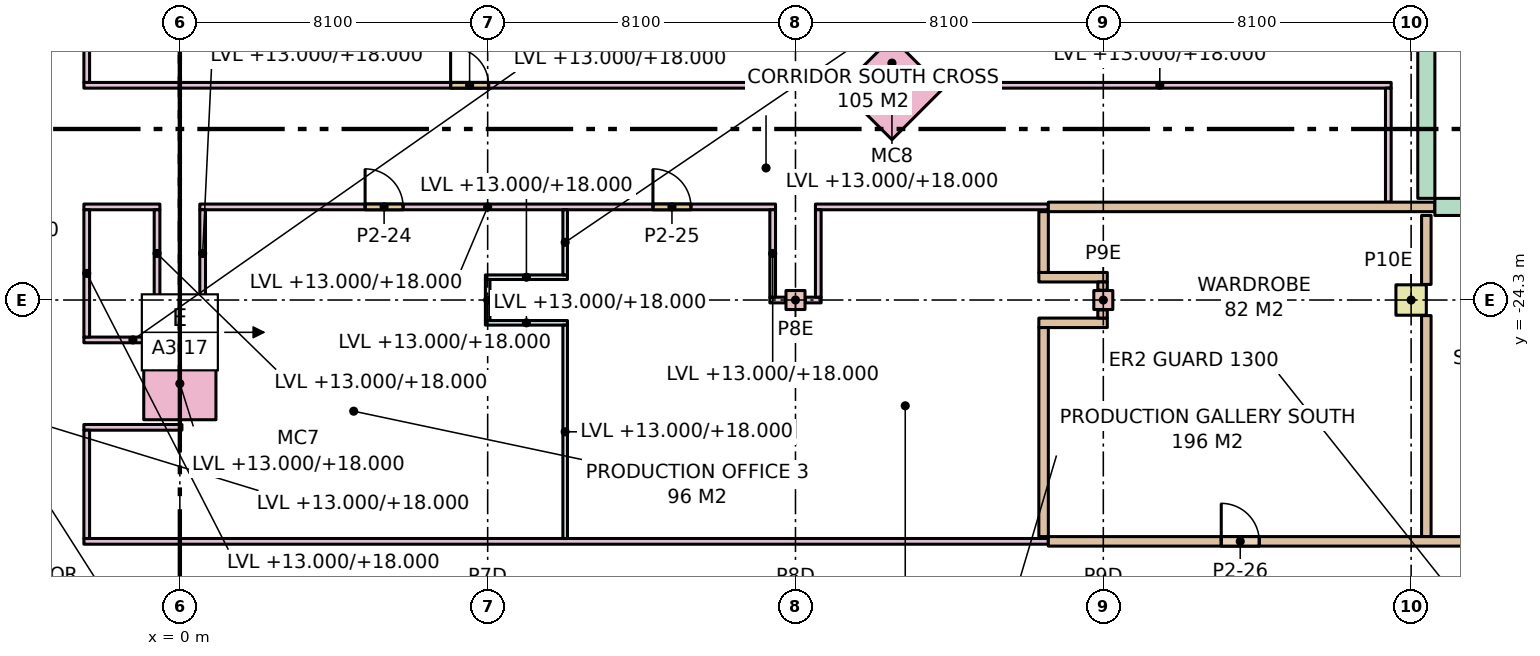
"""IFC4 building model, lengths in metres.
Left out: names, types, materials, properties, quantities, classifications, styles, units other than length and angle.
Written with IfcOpenShell. Run it as: python <this file> out.ifc"""

import sys

from ifc_helpers import new_model, si_unit, direction, frame, frame_2d, origin, origin_2d, place, context, subcontext, project, spatial, rectangle, extrude, element, fill, save


model = new_model("IFC4")
c1 = context("Model", 3, precision=1e-05, world=origin(), true_north=direction((0.0, 1.0)))
c2 = subcontext(c1, "Body", "Model", "MODEL_VIEW")
j1 = project(units=[si_unit("LENGTHUNIT", "METRE"), si_unit("PLANEANGLEUNIT", "RADIAN")], contexts=[c1])
p1 = place(None, origin())
s1 = spatial("IfcSite", under=j1, at=p1, CompositionType="ELEMENT")
p2 = place(p1, origin())
s2 = spatial("IfcBuilding", under=s1, at=p2, CompositionType="ELEMENT")
p3 = place(p2, frame((0.0, 0.0, 13.0)))
s3 = spatial("IfcBuildingStorey", under=s2, at=p3, CompositionType="ELEMENT", Elevation=13.0)
for number, where, z_axis, x_axis in (
    (1, (16.2, -24.3, 0.0), (0.0, 0.0, 1.0), (1.0, 0.0, 0.0)),
    (2, (24.3, -24.3, 0.0), (0.0, 0.0, 1.0), (1.0, 0.0, 0.0)),
):
    element("IfcColumn", number, at=place(p3, frame(where, z_axis=z_axis, x_axis=x_axis)), inside=s3, PredefinedType="COLUMN", context=c2, shape_type="SweptSolid", body=[
        extrude(rectangle(XDim=0.5, YDim=0.5, at=origin_2d()), origin(), (0.0, 0.0, 1.0), 7.0),
    ])
p4 = place(p3, frame((32.4, -24.3, 0.0), z_axis=(0.0, 0.0, 1.0), x_axis=(1.0, 0.0, 0.0)))
e3 = element("IfcColumn", 3, at=p4, inside=s3, PredefinedType="COLUMN", context=c2, shape_type="SweptSolid", body=[
    extrude(rectangle(XDim=0.8, YDim=0.8, at=origin_2d()), origin(), (0.0, 0.0, 1.0), 7.0),
])
for number, where, z_axis, x_axis in (
    (4, (0.0, -26.5, 0.0), (0.0, 0.0, 1.0), (1.0, 0.0, 0.0)),
    (5, (18.738, -18.738, 0.0), (0.0, 0.0, 1.0), (0.707, 0.707, 0.0)),
):
    element("IfcColumn", number, at=place(p3, frame(where, z_axis=z_axis, x_axis=x_axis)), inside=s3, PredefinedType="COLUMN", context=c2, shape_type="SweptSolid", body=[
        extrude(rectangle(XDim=1.9, YDim=1.9, at=origin_2d()), origin(), (0.0, 0.0, 1.0), 5.0),
    ])
for number, where, z_axis, x_axis in (
    (6, (8.04, -24.9, 0.0), (0.0, 0.0, 1.0), (1.0, 0.0, 0.0)),
    (7, (8.04, -23.7, 0.0), (0.0, 0.0, 1.0), (1.0, 0.0, 0.0)),
):
    element("IfcWall", number, at=place(p3, frame(where, z_axis=z_axis, x_axis=x_axis)), inside=s3, PredefinedType="PARTITIONING", context=c2, shape_type="SweptSolid", body=[
        extrude(rectangle(XDim=2.159, YDim=0.12, at=frame_2d((1.08, 0.0))), origin(), (0.0, 0.0, 1.0), 5.0),
    ])
p5 = place(p3, frame((8.1, -24.84, 0.0), z_axis=(0.0, 0.0, 1.0), x_axis=(0.0, 1.0, 0.0)))
e8 = element("IfcWall", 8, at=p5, inside=s3, PredefinedType="PARTITIONING", context=c2, shape_type="SweptSolid", body=[
    extrude(rectangle(XDim=1.08, YDim=0.12, at=frame_2d((0.54, 0.0))), origin(), (0.0, 0.0, 1.0), 5.0),
])
p6 = place(p3, frame((10.139, -30.575, 0.0), z_axis=(0.0, 0.0, 1.0), x_axis=(0.0, 1.0, 0.0)))
e9 = element("IfcWall", 9, at=p6, inside=s3, PredefinedType="PARTITIONING", context=c2, shape_type="SweptSolid", body=[
    extrude(rectangle(XDim=5.615, YDim=0.12, at=frame_2d((2.808, 0.0))), origin(), (0.0, 0.0, 1.0), 5.0),
])
p7 = place(p3, frame((10.139, -23.64, 0.0), z_axis=(0.0, 0.0, 1.0), x_axis=(0.0, 1.0, 0.0)))
e10 = element("IfcWall", 10, at=p7, inside=s3, PredefinedType="PARTITIONING", context=c2, shape_type="SweptSolid", body=[
    extrude(rectangle(XDim=1.715, YDim=0.12, at=frame_2d((0.857, 0.0))), origin(), (0.0, 0.0, 1.0), 5.0),
])
p8 = place(p3, frame((-0.675, -24.3, 0.0), z_axis=(0.0, 0.0, 1.0), x_axis=(1.0, 0.0, 0.0)))
e11 = element("IfcWall", 11, at=p8, inside=s3, PredefinedType="PARTITIONING", context=c2, shape_type="SweptSolid", body=[
    extrude(rectangle(XDim=1.35, YDim=0.15, at=frame_2d((0.675, 0.0))), origin(), (0.0, 0.0, 1.0), 6.68),
])
p9 = place(p3, frame((-2.525, -21.85, 0.0), z_axis=(0.0, 0.0, 1.0), x_axis=(1.0, 0.0, 0.0)))
e12 = element("IfcWall", 12, at=p9, inside=s3, PredefinedType="PARTITIONING", context=c2, shape_type="SweptSolid", body=[
    extrude(rectangle(XDim=2.0, YDim=0.15, at=frame_2d((1.0, 0.0))), origin(), (0.0, 0.0, 1.0), 5.0),
])
p10 = place(p3, frame((0.525, -21.85, 0.0), z_axis=(0.0, 0.0, 1.0), x_axis=(1.0, 0.0, 0.0)))
e13 = element("IfcWall", 13, at=p10, inside=s3, PredefinedType="PARTITIONING", context=c2, shape_type="SweptSolid", body=[
    extrude(rectangle(XDim=15.15, YDim=0.15, at=frame_2d((7.575, 0.0))), origin(), (0.0, 0.0, 1.0), 5.0),
])
p11 = place(p10, frame((4.35, 0.0, 0.0)))
e14 = element("IfcOpeningElement", 14, at=p11, cuts=e13, PredefinedType="OPENING", context=c2, shape_type="SweptSolid", body=[
    extrude(rectangle(XDim=1.0, YDim=2.1, at=frame_2d((0.5, 1.05))), frame((0.0, 0.085, 0.0), z_axis=(0.0, -1.0, 0.0), x_axis=(1.0, 0.0, 0.0)), (0.0, 0.0, 1.0), 0.17),
])
p12 = place(p10, frame((11.924, 0.0, 0.0)))
e15 = element("IfcOpeningElement", 15, at=p12, cuts=e13, PredefinedType="OPENING", context=c2, shape_type="SweptSolid", body=[
    extrude(rectangle(XDim=1.0, YDim=2.1, at=frame_2d((0.5, 1.05))), frame((0.0, 0.085, 0.0), z_axis=(0.0, -1.0, 0.0), x_axis=(1.0, 0.0, 0.0)), (0.0, 0.0, 1.0), 0.17),
])
for number, where, z_axis, x_axis in (
    (16, (-0.6, -24.225, 0.0), (0.0, 0.0, 1.0), (0.0, 1.0, 0.0)),
    (17, (0.6, -24.225, 0.0), (0.0, 0.0, 1.0), (0.0, 1.0, 0.0)),
):
    element("IfcWall", number, at=place(p3, frame(where, z_axis=z_axis, x_axis=x_axis)), inside=s3, PredefinedType="PARTITIONING", context=c2, shape_type="SweptSolid", body=[
        extrude(rectangle(XDim=2.3, YDim=0.15, at=frame_2d((1.15, 0.0))), origin(), (0.0, 0.0, 1.0), 5.0),
    ])
p13 = place(p3, frame((-2.525, -30.65, 0.0), z_axis=(0.0, 0.0, 1.0), x_axis=(1.0, 0.0, 0.0)))
e18 = element("IfcWall", 18, at=p13, inside=s3, PredefinedType="PARTITIONING", context=c2, shape_type="SweptSolid", body=[
    extrude(rectangle(XDim=25.378, YDim=0.15, at=frame_2d((12.689, 0.0))), origin(), (0.0, 0.0, 1.0), 6.68),
])
p14 = place(p3, frame((-2.525, -27.65, 0.0), z_axis=(0.0, 0.0, 1.0), x_axis=(1.0, 0.0, 0.0)))
e19 = element("IfcWall", 19, at=p14, inside=s3, PredefinedType="PARTITIONING", context=c2, shape_type="SweptSolid", body=[
    extrude(rectangle(XDim=2.58, YDim=0.15, at=frame_2d((1.29, 0.0))), origin(), (0.0, 0.0, 1.0), 6.68),
])
p15 = place(p3, frame((-2.525, -25.35, 0.0), z_axis=(0.0, 0.0, 1.0), x_axis=(1.0, 0.0, 0.0)))
e20 = element("IfcWall", 20, at=p15, inside=s3, PredefinedType="PARTITIONING", context=c2, shape_type="SweptSolid", body=[
    extrude(rectangle(XDim=2.58, YDim=0.15, at=frame_2d((1.29, 0.0))), origin(), (0.0, 0.0, 1.0), 5.0),
])
p16 = place(p3, frame((-2.45, -30.575, 0.0), z_axis=(0.0, 0.0, 1.0), x_axis=(0.0, 1.0, 0.0)))
e21 = element("IfcWall", 21, at=p16, inside=s3, PredefinedType="PARTITIONING", context=c2, shape_type="SweptSolid", body=[
    extrude(rectangle(XDim=2.85, YDim=0.15, at=frame_2d((1.425, 0.0))), origin(), (0.0, 0.0, 1.0), 6.68),
])
p17 = place(p3, frame((-2.45, -25.275, 0.0), z_axis=(0.0, 0.0, 1.0), x_axis=(0.0, 1.0, 0.0)))
e22 = element("IfcWall", 22, at=p17, inside=s3, PredefinedType="PARTITIONING", context=c2, shape_type="SweptSolid", body=[
    extrude(rectangle(XDim=3.35, YDim=0.15, at=frame_2d((1.675, 0.0))), origin(), (0.0, 0.0, 1.0), 5.0),
])
for number, where, z_axis, x_axis in (
    (23, (15.525, -24.3, 0.0), (0.0, 0.0, 1.0), (1.0, 0.0, 0.0)),
    (24, (16.46, -24.3, 0.0), (0.0, 0.0, 1.0), (1.0, 0.0, 0.0)),
):
    element("IfcWall", number, at=place(p3, frame(where, z_axis=z_axis, x_axis=x_axis)), inside=s3, PredefinedType="PARTITIONING", context=c2, shape_type="SweptSolid", body=[
        extrude(rectangle(XDim=0.415, YDim=0.15, at=frame_2d((0.208, 0.0))), origin(), (0.0, 0.0, 1.0), 6.68),
    ])
p18 = place(p3, frame((16.725, -21.85, 0.0), z_axis=(0.0, 0.0, 1.0), x_axis=(1.0, 0.0, 0.0)))
e25 = element("IfcWall", 25, at=p18, inside=s3, PredefinedType="PARTITIONING", context=c2, shape_type="SweptSolid", body=[
    extrude(rectangle(XDim=6.128, YDim=0.15, at=frame_2d((3.064, 0.0))), origin(), (0.0, 0.0, 1.0), 6.68),
])
p19 = place(p3, frame((15.6, -24.225, 0.0), z_axis=(0.0, 0.0, 1.0), x_axis=(0.0, 1.0, 0.0)))
e26 = element("IfcWall", 26, at=p19, inside=s3, PredefinedType="PARTITIONING", context=c2, shape_type="SweptSolid", body=[
    extrude(rectangle(XDim=2.3, YDim=0.15, at=frame_2d((1.15, 0.0))), origin(), (0.0, 0.0, 1.0), 5.0),
])
p20 = place(p3, frame((16.8, -24.225, 0.0), z_axis=(0.0, 0.0, 1.0), x_axis=(0.0, 1.0, 0.0)))
e27 = element("IfcWall", 27, at=p20, inside=s3, PredefinedType="PARTITIONING", context=c2, shape_type="SweptSolid", body=[
    extrude(rectangle(XDim=2.3, YDim=0.15, at=frame_2d((1.15, 0.0))), origin(), (0.0, 0.0, 1.0), 6.68),
])
for number, where, z_axis, x_axis in (
    (28, (22.604, -24.9, 0.0), (0.0, 0.0, 1.0), (1.0, 0.0, 0.0)),
    (29, (22.604, -23.7, 0.0), (0.0, 0.0, 1.0), (1.0, 0.0, 0.0)),
):
    element("IfcWall", number, at=place(p3, frame(where, z_axis=z_axis, x_axis=x_axis)), inside=s3, PredefinedType="PARTITIONING", context=c2, shape_type="SweptSolid", body=[
        extrude(rectangle(XDim=1.802, YDim=0.25, at=frame_2d((0.901, 0.0))), origin(), (0.0, 0.0, 1.0), 6.68),
    ])
p21 = place(p3, frame((22.729, -30.525, 0.0), z_axis=(0.0, 0.0, 1.0), x_axis=(0.0, 1.0, 0.0)))
e30 = element("IfcWall", 30, at=p21, inside=s3, PredefinedType="PARTITIONING", context=c2, shape_type="SweptSolid", body=[
    extrude(rectangle(XDim=5.5, YDim=0.25, at=frame_2d((2.75, 0.0))), origin(), (0.0, 0.0, 1.0), 6.68),
])
p22 = place(p3, frame((22.729, -23.575, 0.0), z_axis=(0.0, 0.0, 1.0), x_axis=(0.0, 1.0, 0.0)))
e31 = element("IfcWall", 31, at=p22, inside=s3, PredefinedType="PARTITIONING", context=c2, shape_type="SweptSolid", body=[
    extrude(rectangle(XDim=1.6, YDim=0.25, at=frame_2d((0.8, 0.0))), origin(), (0.0, 0.0, 1.0), 6.68),
])
p23 = place(p3, frame((24.28, -24.775, 0.0), z_axis=(0.0, 0.0, 1.0), x_axis=(0.0, 1.0, 0.0)))
e32 = element("IfcWall", 32, at=p23, inside=s3, PredefinedType="PARTITIONING", context=c2, shape_type="SweptSolid", body=[
    extrude(rectangle(XDim=0.215, YDim=0.25, at=frame_2d((0.107, 0.0))), origin(), (0.0, 0.0, 1.0), 6.68),
])
p24 = place(p3, frame((24.28, -24.04, 0.0), z_axis=(0.0, 0.0, 1.0), x_axis=(0.0, 1.0, 0.0)))
e33 = element("IfcWall", 33, at=p24, inside=s3, PredefinedType="PARTITIONING", context=c2, shape_type="SweptSolid", body=[
    extrude(rectangle(XDim=0.215, YDim=0.25, at=frame_2d((0.107, 0.0))), origin(), (0.0, 0.0, 1.0), 6.68),
])
p25 = place(p3, frame((-2.525, -18.65, 0.0), z_axis=(0.0, 0.0, 1.0), x_axis=(1.0, 0.0, 0.0)))
e34 = element("IfcWall", 34, at=p25, inside=s3, PredefinedType="PARTITIONING", context=c2, shape_type="SweptSolid", body=[
    extrude(rectangle(XDim=20.303, YDim=0.15, at=frame_2d((10.152, 0.0))), origin(), (0.0, 0.0, 1.0), 5.0),
])
p26 = place(p25, frame((9.65, 0.0, 0.0)))
e35 = element("IfcOpeningElement", 35, at=p26, cuts=e34, PredefinedType="OPENING", context=c2, shape_type="SweptSolid", body=[
    extrude(rectangle(XDim=1.0, YDim=2.1, at=frame_2d((0.5, 1.05))), frame((0.0, 0.085, 0.0), z_axis=(0.0, -1.0, 0.0), x_axis=(1.0, 0.0, 0.0)), (0.0, 0.0, 1.0), 0.17),
])
p27 = place(p3, frame((19.698, -18.65, 0.0), z_axis=(0.0, 0.0, 1.0), x_axis=(1.0, 0.0, 0.0)))
e36 = element("IfcWall", 36, at=p27, inside=s3, PredefinedType="PARTITIONING", context=c2, shape_type="SweptSolid", body=[
    extrude(rectangle(XDim=12.177, YDim=0.15, at=frame_2d((6.088, 0.0))), origin(), (0.0, 0.0, 1.0), 5.0),
])
p28 = place(p3, frame((31.8, -21.725, 0.0), z_axis=(0.0, 0.0, 1.0), x_axis=(0.0, 1.0, 0.0)))
e37 = element("IfcWall", 37, at=p28, inside=s3, PredefinedType="PARTITIONING", context=c2, shape_type="SweptSolid", body=[
    extrude(rectangle(XDim=3.0, YDim=0.15, at=frame_2d((1.5, 0.0))), origin(), (0.0, 0.0, 1.0), 6.68),
])
p29 = place(p3, frame((22.854, -21.85, 0.0), z_axis=(0.0, 0.0, 1.0), x_axis=(1.0, 0.0, 0.0)))
e38 = element("IfcWall", 38, at=p29, inside=s3, PredefinedType="PARTITIONING", context=c2, shape_type="SweptSolid", body=[
    extrude(rectangle(XDim=10.171, YDim=0.25, at=frame_2d((5.086, 0.0))), origin(), (0.0, 0.0, 1.0), 6.68),
])
p30 = place(p3, frame((33.025, -21.85, 0.0), z_axis=(0.0, 0.0, 1.0), x_axis=(1.0, 0.0, 0.0)))
e39 = element("IfcWall", 39, at=p30, inside=s3, PredefinedType="PARTITIONING", context=c2, shape_type="SweptSolid", body=[
    extrude(rectangle(XDim=11.4, YDim=0.45, at=frame_2d((5.7, 0.0))), origin(), (0.0, 0.0, 1.0), 6.68),
])
p31 = place(p3, frame((32.8, -30.525, 0.0), z_axis=(0.0, 0.0, 1.0), x_axis=(0.0, 1.0, 0.0)))
e40 = element("IfcWall", 40, at=p31, inside=s3, PredefinedType="PARTITIONING", context=c2, shape_type="SweptSolid", body=[
    extrude(rectangle(XDim=5.815, YDim=0.25, at=frame_2d((2.907, 0.0))), origin(), (0.0, 0.0, 1.0), 6.68),
])
p32 = place(p3, frame((32.8, -23.89, 0.0), z_axis=(0.0, 0.0, 1.0), x_axis=(0.0, 1.0, 0.0)))
e41 = element("IfcWall", 41, at=p32, inside=s3, PredefinedType="PARTITIONING", context=c2, shape_type="SweptSolid", body=[
    extrude(rectangle(XDim=1.815, YDim=0.25, at=frame_2d((0.907, 0.0))), origin(), (0.0, 0.0, 1.0), 6.68),
])
p33 = place(p3, frame((22.854, -30.65, 0.0), z_axis=(0.0, 0.0, 1.0), x_axis=(1.0, 0.0, 0.0)))
e42 = element("IfcWall", 42, at=p33, inside=s3, PredefinedType="PARTITIONING", context=c2, shape_type="SweptSolid", body=[
    extrude(rectangle(XDim=20.386, YDim=0.25, at=frame_2d((10.193, 0.0))), origin(), (0.0, 0.0, 1.0), 6.68),
])
p34 = place(p33, frame((4.55, 0.0, 0.0)))
e43 = element("IfcOpeningElement", 43, at=p34, cuts=e42, PredefinedType="OPENING", context=c2, shape_type="SweptSolid", body=[
    extrude(rectangle(XDim=1.0, YDim=2.1, at=frame_2d((0.5, 1.05))), frame((0.0, 0.135, 0.0), z_axis=(0.0, -1.0, 0.0), x_axis=(1.0, 0.0, 0.0)), (0.0, 0.0, 1.0), 0.27),
])
p35 = place(p33, frame((14.721, 0.0, 0.0)))
e44 = element("IfcOpeningElement", 44, at=p35, cuts=e42, PredefinedType="OPENING", context=c2, shape_type="SweptSolid", body=[
    extrude(rectangle(XDim=1.0, YDim=2.1, at=frame_2d((0.5, 1.05))), frame((0.0, 0.135, 0.0), z_axis=(0.0, -1.0, 0.0), x_axis=(1.0, 0.0, 0.0)), (0.0, 0.0, 1.0), 0.27),
])
p36 = place(p3, frame((-2.45, -18.575, 0.0), z_axis=(0.0, 0.0, 1.0), x_axis=(0.0, 1.0, 0.0)))
e45 = element("IfcWall", 45, at=p36, inside=s3, PredefinedType="PARTITIONING", context=c2, shape_type="SweptSolid", body=[
    extrude(rectangle(XDim=7.1, YDim=0.15, at=frame_2d((3.55, 0.0))), origin(), (0.0, 0.0, 1.0), 5.0),
])
p37 = place(p3, frame((32.8, -21.625, 0.0), z_axis=(0.0, 0.0, 1.0), x_axis=(0.0, 1.0, 0.0)))
e46 = element("IfcWall", 46, at=p37, inside=s3, PredefinedType="PARTITIONING", context=c2, shape_type="SweptSolid", body=[
    extrude(rectangle(XDim=5.015, YDim=0.45, at=frame_2d((2.507, 0.0))), origin(), (0.0, 0.0, 1.0), 6.68),
])
p38 = place(p26, origin())
e47 = element("IfcDoor", 47, at=p38, inside=s3, OperationType="SINGLE_SWING_LEFT", PredefinedType="DOOR", context=c2, shape_type="SweptSolid", body=[
    extrude(rectangle(XDim=1.0, YDim=2.1, at=frame_2d((0.5, 1.05))), frame((0.0, 0.025, 0.0), z_axis=(0.0, -1.0, 0.0), x_axis=(1.0, 0.0, 0.0)), (0.0, 0.0, 1.0), 0.05),
])
fill(e35, e47)
p39 = place(p11, origin())
e48 = element("IfcDoor", 48, at=p39, inside=s3, OperationType="SINGLE_SWING_LEFT", PredefinedType="DOOR", context=c2, shape_type="SweptSolid", body=[
    extrude(rectangle(XDim=1.0, YDim=2.1, at=frame_2d((0.5, 1.05))), frame((0.0, 0.025, 0.0), z_axis=(0.0, -1.0, 0.0), x_axis=(1.0, 0.0, 0.0)), (0.0, 0.0, 1.0), 0.05),
])
fill(e14, e48)
p40 = place(p12, origin())
e49 = element("IfcDoor", 49, at=p40, inside=s3, OperationType="SINGLE_SWING_LEFT", PredefinedType="DOOR", context=c2, shape_type="SweptSolid", body=[
    extrude(rectangle(XDim=1.0, YDim=2.1, at=frame_2d((0.5, 1.05))), frame((0.0, 0.025, 0.0), z_axis=(0.0, -1.0, 0.0), x_axis=(1.0, 0.0, 0.0)), (0.0, 0.0, 1.0), 0.05),
])
fill(e15, e49)
p41 = place(p34, origin())
e50 = element("IfcDoor", 50, at=p41, inside=s3, OperationType="SINGLE_SWING_LEFT", PredefinedType="DOOR", context=c2, shape_type="SweptSolid", body=[
    extrude(rectangle(XDim=1.0, YDim=2.1, at=frame_2d((0.5, 1.05))), frame((0.0, 0.025, 0.0), z_axis=(0.0, -1.0, 0.0), x_axis=(1.0, 0.0, 0.0)), (0.0, 0.0, 1.0), 0.05),
])
fill(e43, e50)
save(model, sys.argv[1])
